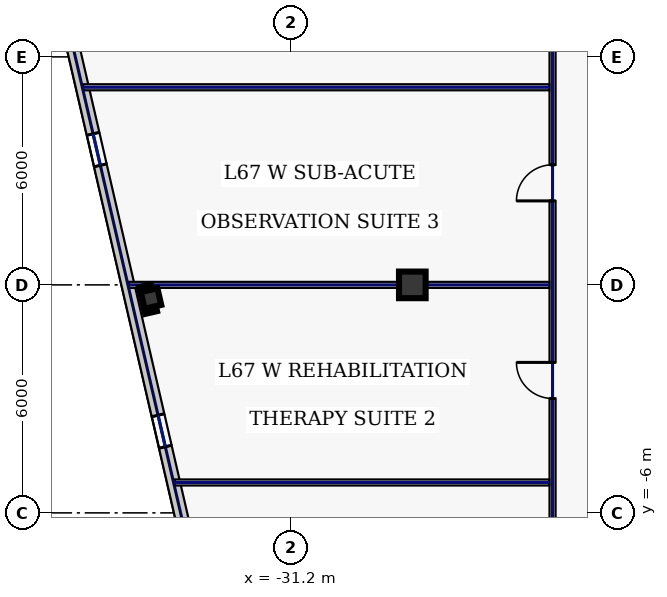
"""IFC4 building model, lengths in metres.
Left out: names, types, materials, properties, quantities, classifications, styles, units other than length and angle.
Written with IfcOpenShell. Run it as: python <this file> out.ifc"""

import sys

from ifc_helpers import new_model, si_unit, direction, frame, frame_2d, origin, origin_2d, place, context, subcontext, project, spatial, rectangle, hollow_rectangle, extrude, element, fill, save


model = new_model("IFC4")
c1 = context("Model", 3, precision=1e-05, world=origin(), true_north=direction((0.0, 1.0)))
c2 = subcontext(c1, "Body", "Model", "MODEL_VIEW")
j1 = project(units=[si_unit("LENGTHUNIT", "METRE"), si_unit("PLANEANGLEUNIT", "RADIAN")], contexts=[c1])
p1 = place(None, origin())
s1 = spatial("IfcSite", under=j1, at=p1, CompositionType="ELEMENT")
p2 = place(p1, origin())
s2 = spatial("IfcBuilding", under=s1, at=p2, CompositionType="ELEMENT")
p3 = place(p2, frame((0.0, 0.0, 289.0)))
s3 = spatial("IfcBuildingStorey", under=s2, at=p3, CompositionType="ELEMENT", Elevation=289.0)
p4 = place(p3, frame((-28.0, 0.0, 0.0), z_axis=(0.0, 0.0, 1.0), x_axis=(1.0, 0.0, 0.0)))
e1 = element("IfcColumn", 1, at=p4, inside=s3, PredefinedType="COLUMN", context=c2, shape_type="SweptSolid", body=[
    extrude(hollow_rectangle(XDim=0.7, YDim=0.7, WallThickness=0.032, at=origin_2d()), origin(), (0.0, 0.0, 1.0), 3.74),
])
p5 = place(p3, frame((-34.877, -0.359, 0.0), z_axis=(0.0, 0.0, 1.0), x_axis=(0.974370064785, 0.224951054344, 0.0)))
e2 = element("IfcColumn", 2, at=p5, inside=s3, PredefinedType="COLUMN", context=c2, shape_type="SweptSolid", body=[
    extrude(hollow_rectangle(XDim=0.45, YDim=0.45, WallThickness=0.022, at=origin_2d()), origin(), (0.0, 0.0, 1.0), 3.74),
])
p6 = place(p3, frame((-37.486, 8.676, 0.0), z_axis=(0.0, 0.0, 1.0), x_axis=(0.224953091034, -0.974369594576, 0.0)))
e3 = element("IfcWall", 3, at=p6, inside=s3, PredefinedType="STANDARD", context=c2, shape_type="SweptSolid", body=[
    extrude(rectangle(XDim=36.2, YDim=0.34, at=frame_2d((18.1, 0.0))), origin(), (0.0, 0.0, 1.0), 3.74),
])
p7 = place(p6, frame((4.825, 0.0, 0.75)))
e4 = element("IfcOpeningElement", 4, at=p7, cuts=e3, PredefinedType="OPENING", context=c2, shape_type="SweptSolid", body=[
    extrude(rectangle(XDim=0.85, YDim=1.85, at=frame_2d((0.425, 0.925))), frame((0.0, 0.18, 0.0), z_axis=(0.0, -1.0, 0.0), x_axis=(1.0, 0.0, 0.0)), (0.0, 0.0, 1.0), 0.36),
])
p8 = place(p6, frame((12.425, 0.0, 0.75)))
e5 = element("IfcOpeningElement", 5, at=p8, cuts=e3, PredefinedType="OPENING", context=c2, shape_type="SweptSolid", body=[
    extrude(rectangle(XDim=0.85, YDim=1.85, at=frame_2d((0.425, 0.925))), frame((0.0, 0.18, 0.0), z_axis=(0.0, -1.0, 0.0), x_axis=(1.0, 0.0, 0.0)), (0.0, 0.0, 1.0), 0.36),
])
p9 = place(p6, frame((21.825, 0.0, 0.58)))
e6 = element("IfcOpeningElement", 6, at=p9, cuts=e3, PredefinedType="OPENING", context=c2, shape_type="SweptSolid", body=[
    extrude(rectangle(XDim=1.6, YDim=2.3, at=frame_2d((0.8, 1.15))), frame((0.0, 0.18, 0.0), z_axis=(0.0, -1.0, 0.0), x_axis=(1.0, 0.0, 0.0)), (0.0, 0.0, 1.0), 0.36),
])
p10 = place(p6, frame((30.875, 0.0, 0.58)))
e7 = element("IfcOpeningElement", 7, at=p10, cuts=e3, PredefinedType="OPENING", context=c2, shape_type="SweptSolid", body=[
    extrude(rectangle(XDim=1.6, YDim=2.3, at=frame_2d((0.8, 1.15))), frame((0.0, 0.18, 0.0), z_axis=(0.0, -1.0, 0.0), x_axis=(1.0, 0.0, 0.0)), (0.0, 0.0, 1.0), 0.36),
])
p11 = place(p3, frame((-24.31, -9.615, 0.0), z_axis=(0.0, 0.0, 1.0), x_axis=(0.0, 1.0, 0.0)))
e8 = element("IfcWall", 8, at=p11, inside=s3, PredefinedType="PARTITIONING", context=c2, shape_type="SweptSolid", body=[
    extrude(rectangle(XDim=19.28, YDim=0.16, at=frame_2d((9.64, 0.0))), origin(), (0.0, 0.0, 1.0), 3.74),
])
p12 = place(p11, frame((1.969, 0.0, 0.0)))
e9 = element("IfcOpeningElement", 9, at=p12, cuts=e8, PredefinedType="OPENING", context=c2, shape_type="SweptSolid", body=[
    extrude(rectangle(XDim=0.95, YDim=2.2, at=frame_2d((0.475, 1.1))), frame((0.0, 0.09, 0.0), z_axis=(0.0, -1.0, 0.0), x_axis=(1.0, 0.0, 0.0)), (0.0, 0.0, 1.0), 0.18),
])
p13 = place(p11, frame((6.625, 0.0, 0.0)))
e10 = element("IfcOpeningElement", 10, at=p13, cuts=e8, PredefinedType="OPENING", context=c2, shape_type="SweptSolid", body=[
    extrude(rectangle(XDim=0.95, YDim=2.2, at=frame_2d((0.475, 1.1))), frame((0.0, 0.09, 0.0), z_axis=(0.0, -1.0, 0.0), x_axis=(1.0, 0.0, 0.0)), (0.0, 0.0, 1.0), 0.18),
])
p14 = place(p11, frame((11.825, 0.0, 0.0)))
e11 = element("IfcOpeningElement", 11, at=p14, cuts=e8, PredefinedType="OPENING", context=c2, shape_type="SweptSolid", body=[
    extrude(rectangle(XDim=0.95, YDim=2.2, at=frame_2d((0.475, 1.1))), frame((0.0, 0.09, 0.0), z_axis=(0.0, -1.0, 0.0), x_axis=(1.0, 0.0, 0.0)), (0.0, 0.0, 1.0), 0.18),
])
p15 = place(p11, frame((16.506, 0.0, 0.0)))
e12 = element("IfcOpeningElement", 12, at=p15, cuts=e8, PredefinedType="OPENING", context=c2, shape_type="SweptSolid", body=[
    extrude(rectangle(XDim=0.95, YDim=2.2, at=frame_2d((0.475, 1.1))), frame((0.0, 0.09, 0.0), z_axis=(0.0, -1.0, 0.0), x_axis=(1.0, 0.0, 0.0)), (0.0, 0.0, 1.0), 0.18),
])
p16 = place(p3, frame((-34.262, -5.2, 0.0), z_axis=(0.0, 0.0, 1.0), x_axis=(1.0, 0.0, 0.0)))
e13 = element("IfcWall", 13, at=p16, inside=s3, PredefinedType="PARTITIONING", context=c2, shape_type="SweptSolid", body=[
    extrude(rectangle(XDim=9.867, YDim=0.16, at=frame_2d((4.933, 0.0))), origin(), (0.0, 0.0, 1.0), 3.74),
])
p17 = place(p3, frame((-35.462, 0.0, 0.0), z_axis=(0.0, 0.0, 1.0), x_axis=(1.0, 0.0, 0.0)))
e14 = element("IfcWall", 14, at=p17, inside=s3, PredefinedType="PARTITIONING", context=c2, shape_type="SweptSolid", body=[
    extrude(rectangle(XDim=11.067, YDim=0.16, at=frame_2d((5.534, 0.0))), origin(), (0.0, 0.0, 1.0), 3.335),
])
p18 = place(p3, frame((-36.663, 5.2, 0.0), z_axis=(0.0, 0.0, 1.0), x_axis=(1.0, 0.0, 0.0)))
e15 = element("IfcWall", 15, at=p18, inside=s3, PredefinedType="PARTITIONING", context=c2, shape_type="SweptSolid", body=[
    extrude(rectangle(XDim=12.268, YDim=0.16, at=frame_2d((6.134, 0.0))), origin(), (0.0, 0.0, 1.0), 3.74),
])
p19 = place(p7, origin())
e16 = element("IfcWindow", 16, at=p19, inside=s3, PartitioningType="SINGLE_PANEL", PredefinedType="WINDOW", context=c2, shape_type="SweptSolid", body=[
    extrude(rectangle(XDim=0.85, YDim=1.85, at=frame_2d((0.425, 0.925))), frame((0.0, 0.03, 0.0), z_axis=(0.0, -1.0, 0.0), x_axis=(1.0, 0.0, 0.0)), (0.0, 0.0, 1.0), 0.06),
])
fill(e4, e16)
p20 = place(p8, origin())
e17 = element("IfcWindow", 17, at=p20, inside=s3, PartitioningType="SINGLE_PANEL", PredefinedType="WINDOW", context=c2, shape_type="SweptSolid", body=[
    extrude(rectangle(XDim=0.85, YDim=1.85, at=frame_2d((0.425, 0.925))), frame((0.0, 0.03, 0.0), z_axis=(0.0, -1.0, 0.0), x_axis=(1.0, 0.0, 0.0)), (0.0, 0.0, 1.0), 0.06),
])
fill(e5, e17)
p21 = place(p13, origin())
e18 = element("IfcDoor", 18, at=p21, inside=s3, OperationType="SINGLE_SWING_RIGHT", PredefinedType="DOOR", context=c2, shape_type="SweptSolid", body=[
    extrude(rectangle(XDim=0.95, YDim=2.2, at=frame_2d((0.475, 1.1))), frame((0.0, 0.025, 0.0), z_axis=(0.0, -1.0, 0.0), x_axis=(1.0, 0.0, 0.0)), (0.0, 0.0, 1.0), 0.05),
])
fill(e10, e18)
p22 = place(p14, origin())
e19 = element("IfcDoor", 19, at=p22, inside=s3, OperationType="SINGLE_SWING_LEFT", PredefinedType="DOOR", context=c2, shape_type="SweptSolid", body=[
    extrude(rectangle(XDim=0.95, YDim=2.2, at=frame_2d((0.475, 1.1))), frame((0.0, 0.025, 0.0), z_axis=(0.0, -1.0, 0.0), x_axis=(1.0, 0.0, 0.0)), (0.0, 0.0, 1.0), 0.05),
])
fill(e11, e19)
save(model, sys.argv[1])
